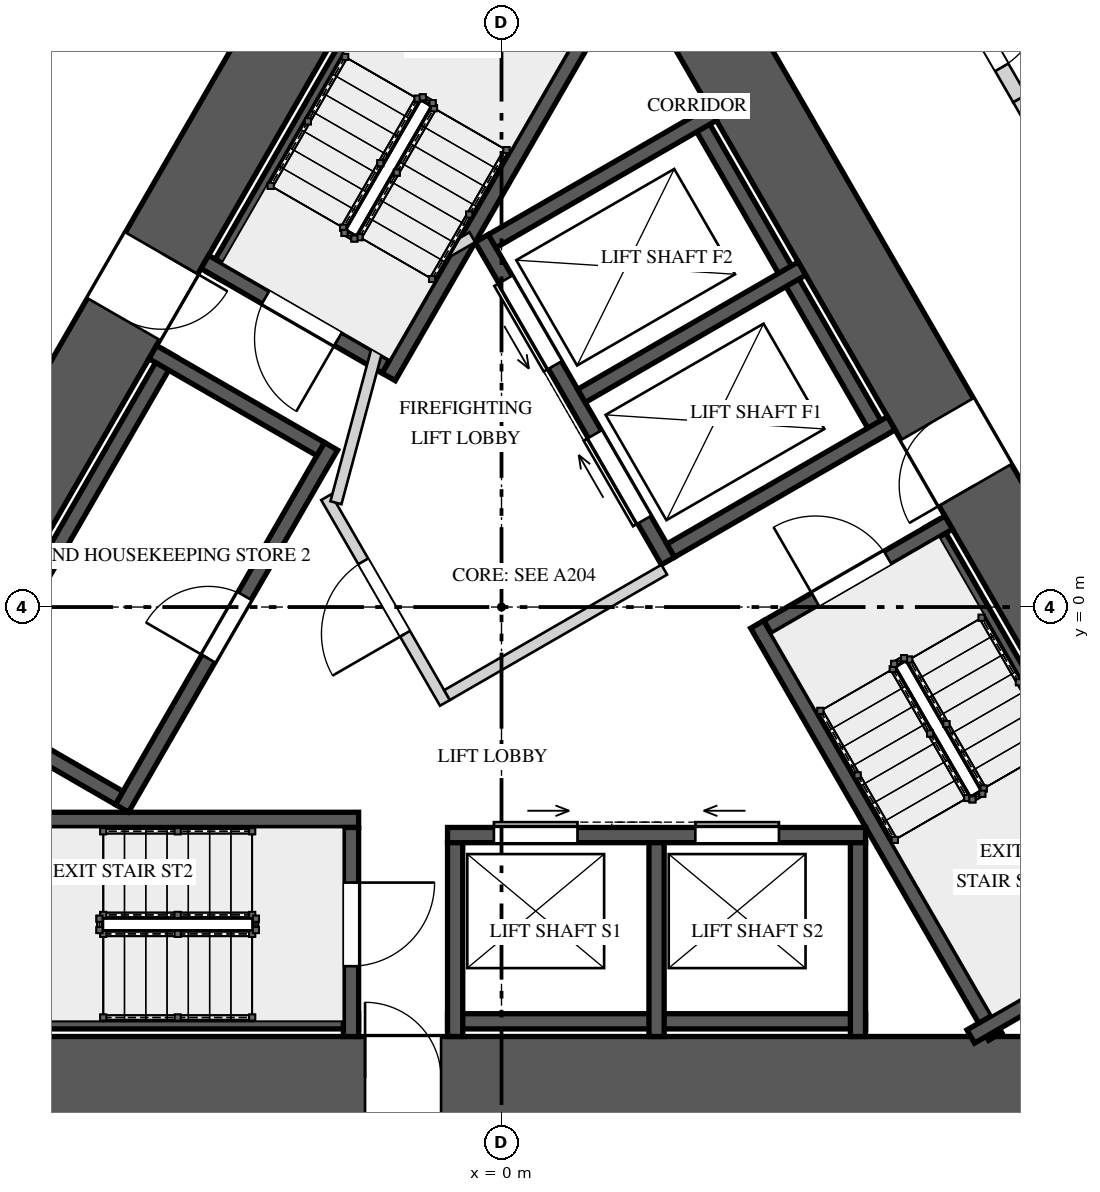
"""IFC4 building model, lengths in metres.
Left out: names, types, materials, properties, quantities, classifications, styles, units other than length and angle.
Written with IfcOpenShell. Run it as: python <this file> out.ifc"""

import sys

from ifc_helpers import new_model, si_unit, direction, frame, frame_2d, origin, place, context, subcontext, project, spatial, rectangle, extrude, element, fill, save


model = new_model("IFC4")
c1 = context("Model", 3, precision=1e-05, world=origin(), true_north=direction((0.0, 1.0)))
c2 = subcontext(c1, "Body", "Model", "MODEL_VIEW")
j1 = project(units=[si_unit("LENGTHUNIT", "METRE"), si_unit("PLANEANGLEUNIT", "RADIAN")], contexts=[c1])
p1 = place(None, origin())
s1 = spatial("IfcSite", under=j1, at=p1, CompositionType="ELEMENT")
p2 = place(p1, origin())
s2 = spatial("IfcBuilding", under=s1, at=p2, CompositionType="ELEMENT")
p3 = place(p2, frame((0.0, 0.0, 15.0)))
s3 = spatial("IfcBuildingStorey", under=s2, at=p3, CompositionType="ELEMENT", Elevation=15.0)
p4 = place(p3, frame((-1.126, 10.45, 0.0), z_axis=(0.0, 0.0, 1.0), x_axis=(-0.500001757713, -0.866024388966, 0.0)))
e1 = element("IfcWall", 1, at=p4, inside=s3, PredefinedType="SHEAR", context=c2, shape_type="SweptSolid", body=[
    extrude(rectangle(XDim=16.974, YDim=1.1, at=frame_2d((8.487, 0.0))), origin(), (0.0, 0.0, 1.0), 5.0),
])
p5 = place(p4, frame((6.692, 0.0, 0.0)))
e2 = element("IfcOpeningElement", 2, at=p5, cuts=e1, PredefinedType="OPENING", context=c2, shape_type="SweptSolid", body=[
    extrude(rectangle(XDim=1.0, YDim=2.4, at=frame_2d((0.5, 1.2))), frame((0.0, 0.56, 0.0), z_axis=(0.0, -1.0, 0.0), x_axis=(1.0, 0.0, 0.0)), (0.0, 0.0, 1.0), 1.12),
])
p6 = place(p4, frame((14.397, 0.0, 0.0)))
e3 = element("IfcOpeningElement", 3, at=p6, cuts=e1, PredefinedType="OPENING", context=c2, shape_type="SweptSolid", body=[
    extrude(rectangle(XDim=0.8, YDim=2.1, at=frame_2d((0.4, 1.05))), frame((0.0, 0.56, 0.0), z_axis=(0.0, -1.0, 0.0), x_axis=(1.0, 0.0, 0.0)), (0.0, 0.0, 1.0), 1.12),
])
p7 = place(p3, frame((-8.487, -6.2, 0.0), z_axis=(0.0, 0.0, 1.0), x_axis=(1.0, 0.0, 0.0)))
e4 = element("IfcWall", 4, at=p7, inside=s3, PredefinedType="SHEAR", context=c2, shape_type="SweptSolid", body=[
    extrude(rectangle(XDim=16.974, YDim=1.1, at=frame_2d((8.487, 0.0))), origin(), (0.0, 0.0, 1.0), 5.0),
])
p8 = place(p7, frame((6.692, 0.0, 0.0)))
e5 = element("IfcOpeningElement", 5, at=p8, cuts=e4, PredefinedType="OPENING", context=c2, shape_type="SweptSolid", body=[
    extrude(rectangle(XDim=1.0, YDim=2.4, at=frame_2d((0.5, 1.2))), frame((0.0, 0.56, 0.0), z_axis=(0.0, -1.0, 0.0), x_axis=(1.0, 0.0, 0.0)), (0.0, 0.0, 1.0), 1.12),
])
p9 = place(p3, frame((9.613, -4.25, 0.0), z_axis=(0.0, 0.0, 1.0), x_axis=(-0.500001757713, 0.866024388966, 0.0)))
e6 = element("IfcWall", 6, at=p9, inside=s3, PredefinedType="SHEAR", context=c2, shape_type="SweptSolid", body=[
    extrude(rectangle(XDim=16.974, YDim=1.1, at=frame_2d((8.487, 0.0))), origin(), (0.0, 0.0, 1.0), 5.0),
])
p10 = place(p9, frame((6.762, 0.0, 0.0)))
e7 = element("IfcOpeningElement", 7, at=p10, cuts=e6, PredefinedType="OPENING", context=c2, shape_type="SweptSolid", body=[
    extrude(rectangle(XDim=1.0, YDim=2.4, at=frame_2d((0.5, 1.2))), frame((0.0, 0.56, 0.0), z_axis=(0.0, -1.0, 0.0), x_axis=(1.0, 0.0, 0.0)), (0.0, 0.0, 1.0), 1.12),
])
p11 = place(p3, frame((-0.68, 9.722, 0.0), z_axis=(0.0, 0.0, 1.0), x_axis=(-0.49998037582, -0.866036733513, 0.0)))
e8 = element("IfcWall", 8, at=p11, inside=s3, PredefinedType="SOLIDWALL", context=c2, shape_type="SweptSolid", body=[
    extrude(rectangle(XDim=6.2, YDim=0.2, at=frame_2d((3.1, 0.0))), origin(), (0.0, 0.0, 1.0), 4.65),
])
p12 = place(p3, frame((1.646, 8.45, 0.0), z_axis=(0.0, 0.0, 1.0), x_axis=(-0.500006002103, -0.866021938441, 0.0)))
e9 = element("IfcWall", 9, at=p12, inside=s3, PredefinedType="SOLIDWALL", context=c2, shape_type="SweptSolid", body=[
    extrude(rectangle(XDim=6.261, YDim=0.2, at=frame_2d((3.13, 0.0))), origin(), (0.0, 0.0, 1.0), 4.65),
])
p13 = place(p3, frame((-1.521, 3.165, 0.0), z_axis=(0.0, 0.0, 1.0), x_axis=(-0.866027397988, 0.499996545922, 0.0)))
e10 = element("IfcWall", 10, at=p13, inside=s3, PredefinedType="SOLIDWALL", context=c2, shape_type="SweptSolid", body=[
    extrude(rectangle(XDim=2.75, YDim=0.2, at=frame_2d((1.375, 0.0))), origin(), (0.0, 0.0, 1.0), 4.65),
])
p14 = place(p13, frame((0.725, 0.0, 0.0)))
e11 = element("IfcOpeningElement", 11, at=p14, cuts=e10, PredefinedType="OPENING", context=c2, shape_type="SweptSolid", body=[
    extrude(rectangle(XDim=1.1, YDim=2.4, at=frame_2d((0.55, 1.2))), frame((0.0, 0.11, 0.0), z_axis=(0.0, -1.0, 0.0), x_axis=(1.0, 0.0, 0.0)), (0.0, 0.0, 1.0), 0.22),
])
p15 = place(p3, frame((-8.08, -5.45, 0.0), z_axis=(0.0, 0.0, 1.0), x_axis=(1.0, 0.0, 0.0)))
e12 = element("IfcWall", 12, at=p15, inside=s3, PredefinedType="SOLIDWALL", context=c2, shape_type="SweptSolid", body=[
    extrude(rectangle(XDim=6.2, YDim=0.2, at=frame_2d((3.1, 0.0))), origin(), (0.0, 0.0, 1.0), 4.65),
])
p16 = place(p3, frame((-8.141, -2.8, 0.0), z_axis=(0.0, 0.0, 1.0), x_axis=(1.0, 0.0, 0.0)))
e13 = element("IfcWall", 13, at=p16, inside=s3, PredefinedType="SOLIDWALL", context=c2, shape_type="SweptSolid", body=[
    extrude(rectangle(XDim=6.261, YDim=0.2, at=frame_2d((3.13, 0.0))), origin(), (0.0, 0.0, 1.0), 4.65),
])
p17 = place(p3, frame((-1.98, -2.9, 0.0), z_axis=(0.0, 0.0, 1.0), x_axis=(0.0, -1.0, 0.0)))
e14 = element("IfcWall", 14, at=p17, inside=s3, PredefinedType="SOLIDWALL", context=c2, shape_type="SweptSolid", body=[
    extrude(rectangle(XDim=2.75, YDim=0.2, at=frame_2d((1.375, 0.0))), origin(), (0.0, 0.0, 1.0), 4.65),
])
p18 = place(p17, frame((0.725, 0.0, 0.0)))
e15 = element("IfcOpeningElement", 15, at=p18, cuts=e14, PredefinedType="OPENING", context=c2, shape_type="SweptSolid", body=[
    extrude(rectangle(XDim=1.1, YDim=2.4, at=frame_2d((0.55, 1.2))), frame((0.0, 0.11, 0.0), z_axis=(0.0, -1.0, 0.0), x_axis=(1.0, 0.0, 0.0)), (0.0, 0.0, 1.0), 0.22),
])
p19 = place(p3, frame((8.76, -4.272, 0.0), z_axis=(0.0, 0.0, 1.0), x_axis=(-0.49998037582, 0.866036733513, 0.0)))
e16 = element("IfcWall", 16, at=p19, inside=s3, PredefinedType="SOLIDWALL", context=c2, shape_type="SweptSolid", body=[
    extrude(rectangle(XDim=6.2, YDim=0.2, at=frame_2d((3.1, 0.0))), origin(), (0.0, 0.0, 1.0), 4.65),
])
p20 = place(p3, frame((6.495, -5.65, 0.0), z_axis=(0.0, 0.0, 1.0), x_axis=(-0.499976754523, 0.866038824151, 0.0)))
e17 = element("IfcWall", 17, at=p20, inside=s3, PredefinedType="SOLIDWALL", context=c2, shape_type="SweptSolid", body=[
    extrude(rectangle(XDim=6.26, YDim=0.2, at=frame_2d((3.13, 0.0))), origin(), (0.0, 0.0, 1.0), 4.65),
])
p21 = place(p3, frame((6.174, -5.65, 0.0), z_axis=(0.0, 0.0, 1.0), x_axis=(0.866054327916, 0.499949898588, 0.0)))
e18 = element("IfcWall", 18, at=p21, inside=s3, PredefinedType="SOLIDWALL", context=c2, shape_type="SweptSolid", body=[
    extrude(rectangle(XDim=3.128, YDim=0.2, at=frame_2d((1.564, 0.0))), origin(), (0.0, 0.0, 1.0), 4.65),
])
p22 = place(p3, frame((3.501, -0.265, 0.0), z_axis=(0.0, 0.0, 1.0), x_axis=(0.866027397988, 0.499996545922, 0.0)))
e19 = element("IfcWall", 19, at=p22, inside=s3, PredefinedType="SOLIDWALL", context=c2, shape_type="SweptSolid", body=[
    extrude(rectangle(XDim=2.75, YDim=0.2, at=frame_2d((1.375, 0.0))), origin(), (0.0, 0.0, 1.0), 4.65),
])
p23 = place(p22, frame((0.725, 0.0, 0.0)))
e20 = element("IfcOpeningElement", 20, at=p23, cuts=e19, PredefinedType="OPENING", context=c2, shape_type="SweptSolid", body=[
    extrude(rectangle(XDim=1.1, YDim=2.4, at=frame_2d((0.55, 1.2))), frame((0.0, 0.11, 0.0), z_axis=(0.0, -1.0, 0.0), x_axis=(1.0, 0.0, 0.0)), (0.0, 0.0, 1.0), 0.22),
])
p24 = place(p3, frame((-4.993, -2.648, 0.0), z_axis=(0.0, 0.0, 1.0), x_axis=(0.499996545922, 0.866027397988, 0.0)))
e21 = element("IfcWall", 21, at=p24, inside=s3, PredefinedType="SOLIDWALL", context=c2, shape_type="SweptSolid", body=[
    extrude(rectangle(XDim=5.5, YDim=0.2, at=frame_2d((2.75, 0.0))), origin(), (0.0, 0.0, 1.0), 4.65),
])
p25 = place(p24, frame((2.275, 0.0, 0.0)))
e22 = element("IfcOpeningElement", 22, at=p25, cuts=e21, PredefinedType="OPENING", context=c2, shape_type="SweptSolid", body=[
    extrude(rectangle(XDim=0.95, YDim=2.4, at=frame_2d((0.475, 1.2))), frame((0.0, 0.11, 0.0), z_axis=(0.0, -1.0, 0.0), x_axis=(1.0, 0.0, 0.0)), (0.0, 0.0, 1.0), 0.22),
])
p26 = place(p3, frame((-4.365, 3.34, 0.0), z_axis=(0.0, 0.0, 1.0), x_axis=(-0.499996545922, -0.866027397988, 0.0)))
e23 = element("IfcWall", 23, at=p26, inside=s3, PredefinedType="SOLIDWALL", context=c2, shape_type="SweptSolid", body=[
    extrude(rectangle(XDim=5.5, YDim=0.2, at=frame_2d((2.75, 0.0))), origin(), (0.0, 0.0, 1.0), 4.65),
])
for number, where, z_axis, x_axis in (
    (24, (-2.38, 2.078, 0.0), (0.0, 0.0, 1.0), (-0.866, 0.5, 0.0)),
    (25, (-5.03, -2.512, 0.0), (0.0, 0.0, 1.0), (-0.866, 0.5, 0.0)),
):
    element("IfcWall", number, at=place(p3, frame(where, z_axis=z_axis, x_axis=x_axis)), inside=s3, PredefinedType="SOLIDWALL", context=c2, shape_type="SweptSolid", body=[
        extrude(rectangle(XDim=2.55, YDim=0.2, at=frame_2d((1.275, 0.0))), origin(), (0.0, 0.0, 1.0), 4.65),
    ])
p27 = place(p3, frame((-0.71, -3.0, 0.0), z_axis=(0.0, 0.0, 1.0), x_axis=(1.0, 0.0, 0.0)))
e26 = element("IfcWall", 26, at=p27, inside=s3, PredefinedType="SOLIDWALL", context=c2, shape_type="SweptSolid", body=[
    extrude(rectangle(XDim=5.5, YDim=0.2, at=frame_2d((2.75, 0.0))), origin(), (0.0, 0.0, 1.0), 4.65),
])
p28 = place(p27, frame((0.61, 0.0, 0.0)))
e27 = element("IfcOpeningElement", 27, at=p28, cuts=e26, PredefinedType="OPENING", context=c2, shape_type="SweptSolid", body=[
    extrude(rectangle(XDim=1.1, YDim=2.1, at=frame_2d((0.55, 1.05))), frame((0.0, 0.11, 0.0), z_axis=(0.0, -1.0, 0.0), x_axis=(1.0, 0.0, 0.0)), (0.0, 0.0, 1.0), 0.22),
])
p29 = place(p27, frame((3.26, 0.0, 0.0)))
e28 = element("IfcOpeningElement", 28, at=p29, cuts=e26, PredefinedType="OPENING", context=c2, shape_type="SweptSolid", body=[
    extrude(rectangle(XDim=1.1, YDim=2.1, at=frame_2d((0.55, 1.05))), frame((0.0, 0.11, 0.0), z_axis=(0.0, -1.0, 0.0), x_axis=(1.0, 0.0, 0.0)), (0.0, 0.0, 1.0), 0.22),
])
p30 = place(p3, frame((-0.71, -5.45, 0.0), z_axis=(0.0, 0.0, 1.0), x_axis=(1.0, 0.0, 0.0)))
e29 = element("IfcWall", 29, at=p30, inside=s3, PredefinedType="SOLIDWALL", context=c2, shape_type="SweptSolid", body=[
    extrude(rectangle(XDim=5.5, YDim=0.2, at=frame_2d((2.75, 0.0))), origin(), (0.0, 0.0, 1.0), 4.65),
])
for number, where, z_axis, x_axis in (
    (30, (-0.61, -3.1, 0.0), (0.0, 0.0, 1.0), (0.0, -1.0, 0.0)),
    (31, (2.04, -3.1, 0.0), (0.0, 0.0, 1.0), (0.0, -1.0, 0.0)),
    (32, (4.69, -3.1, 0.0), (0.0, 0.0, 1.0), (0.0, -1.0, 0.0)),
):
    element("IfcWall", number, at=place(p3, frame(where, z_axis=z_axis, x_axis=x_axis)), inside=s3, PredefinedType="SOLIDWALL", context=c2, shape_type="SweptSolid", body=[
        extrude(rectangle(XDim=2.55, YDim=0.2, at=frame_2d((1.275, 0.0))), origin(), (0.0, 0.0, 1.0), 4.65),
    ])
p31 = place(p3, frame((2.19, 0.606, 0.0), z_axis=(0.0, 0.0, 1.0), x_axis=(-0.500002801628, 0.866023786258, 0.0)))
e33 = element("IfcWall", 33, at=p31, inside=s3, PredefinedType="SOLIDWALL", context=c2, shape_type="SweptSolid", body=[
    extrude(rectangle(XDim=4.9, YDim=0.2, at=frame_2d((2.45, 0.0))), origin(), (0.0, 0.0, 1.0), 4.65),
])
p32 = place(p31, frame((0.625, 0.0, 0.0)))
e34 = element("IfcOpeningElement", 34, at=p32, cuts=e33, PredefinedType="OPENING", context=c2, shape_type="SweptSolid", body=[
    extrude(rectangle(XDim=1.3, YDim=2.1, at=frame_2d((0.65, 1.05))), frame((0.0, 0.11, 0.0), z_axis=(0.0, -1.0, 0.0), x_axis=(1.0, 0.0, 0.0)), (0.0, 0.0, 1.0), 0.22),
])
p33 = place(p31, frame((2.975, 0.0, 0.0)))
e35 = element("IfcOpeningElement", 35, at=p33, cuts=e33, PredefinedType="OPENING", context=c2, shape_type="SweptSolid", body=[
    extrude(rectangle(XDim=1.3, YDim=2.1, at=frame_2d((0.65, 1.05))), frame((0.0, 0.11, 0.0), z_axis=(0.0, -1.0, 0.0), x_axis=(1.0, 0.0, 0.0)), (0.0, 0.0, 1.0), 0.22),
])
p34 = place(p3, frame((5.005, 2.231, 0.0), z_axis=(0.0, 0.0, 1.0), x_axis=(-0.500002801628, 0.866023786258, 0.0)))
e36 = element("IfcWall", 36, at=p34, inside=s3, PredefinedType="SOLIDWALL", context=c2, shape_type="SweptSolid", body=[
    extrude(rectangle(XDim=4.9, YDim=0.2, at=frame_2d((2.45, 0.0))), origin(), (0.0, 0.0, 1.0), 4.65),
])
p35 = place(p3, frame((2.227, 0.743, 0.0), z_axis=(0.0, 0.0, 1.0), x_axis=(0.866014461049, 0.500018952895, 0.0)))
e37 = element("IfcWall", 37, at=p35, inside=s3, PredefinedType="SOLIDWALL", context=c2, shape_type="SweptSolid", body=[
    extrude(rectangle(XDim=3.35, YDim=0.2, at=frame_2d((1.675, 0.0))), origin(), (0.0, 0.0, 1.0), 4.65),
])
p36 = place(p3, frame((1.052, 2.778, 0.0), z_axis=(0.0, 0.0, 1.0), x_axis=(0.866032680314, 0.499987396469, 0.0)))
e38 = element("IfcWall", 38, at=p36, inside=s3, PredefinedType="SOLIDWALL", context=c2, shape_type="SweptSolid", body=[
    extrude(rectangle(XDim=3.35, YDim=0.2, at=frame_2d((1.675, 0.0))), origin(), (0.0, 0.0, 1.0), 4.65),
])
p37 = place(p3, frame((-0.123, 4.813, 0.0), z_axis=(0.0, 0.0, 1.0), x_axis=(0.866014461049, 0.500018952895, 0.0)))
e39 = element("IfcWall", 39, at=p37, inside=s3, PredefinedType="SOLIDWALL", context=c2, shape_type="SweptSolid", body=[
    extrude(rectangle(XDim=3.35, YDim=0.2, at=frame_2d((1.675, 0.0))), origin(), (0.0, 0.0, 1.0), 4.65),
])
p38 = place(p3, frame((-0.744, -1.261, 0.0), z_axis=(0.0, 0.0, 1.0), x_axis=(-0.500004234368, 0.866022959057, 0.0)))
e40 = element("IfcWall", 40, at=p38, inside=s3, PredefinedType="PARTITIONING", context=c2, shape_type="SweptSolid", body=[
    extrude(rectangle(XDim=3.125, YDim=0.15, at=frame_2d((1.562, 0.0))), origin(), (0.0, 0.0, 1.0), 4.65),
])
p39 = place(p38, frame((1.05, 0.0, 0.0)))
e41 = element("IfcOpeningElement", 41, at=p39, cuts=e40, PredefinedType="OPENING", context=c2, shape_type="SweptSolid", body=[
    extrude(rectangle(XDim=1.1, YDim=2.4, at=frame_2d((0.55, 1.2))), frame((0.0, 0.085, 0.0), z_axis=(0.0, -1.0, 0.0), x_axis=(1.0, 0.0, 0.0)), (0.0, 0.0, 1.0), 0.17),
])
p40 = place(p3, frame((-0.717, -1.159, 0.0), z_axis=(0.0, 0.0, 1.0), x_axis=(0.866008176907, 0.50002983664, 0.0)))
e42 = element("IfcWall", 42, at=p40, inside=s3, PredefinedType="PARTITIONING", context=c2, shape_type="SweptSolid", body=[
    extrude(rectangle(XDim=3.3, YDim=0.15, at=frame_2d((1.65, 0.0))), origin(), (0.0, 0.0, 1.0), 4.65),
])
p41 = place(p3, frame((-2.178, 1.372, 0.0), z_axis=(0.0, 0.0, 1.0), x_axis=(0.258808958833, 0.96592852884, 0.0)))
e43 = element("IfcWall", 43, at=p41, inside=s3, PredefinedType="PARTITIONING", context=c2, shape_type="SweptSolid", body=[
    extrude(rectangle(XDim=2.903, YDim=0.15, at=frame_2d((1.451, 0.0))), origin(), (0.0, 0.0, 1.0), 4.65),
])
p42 = place(p3, frame((-1.51, 4.215, 0.0), z_axis=(0.0, 0.0, 1.0), x_axis=(0.866085525409, 0.49989585183, 0.0)))
e44 = element("IfcWall", 44, at=p42, inside=s3, PredefinedType="PARTITIONING", context=c2, shape_type="SweptSolid", body=[
    extrude(rectangle(XDim=1.3, YDim=0.15, at=frame_2d((0.65, 0.0))), origin(), (0.0, 0.0, 1.0), 4.65),
])
p43 = place(p3, frame((5.287, 9.343, 0.0), z_axis=(0.0, 0.0, 1.0), x_axis=(0.499952348839, -0.866052913447, 0.0)))
e45 = element("IfcWall", 45, at=p43, inside=s3, PredefinedType="SOLIDWALL", context=c2, shape_type="SweptSolid", body=[
    extrude(rectangle(XDim=3.064, YDim=0.2, at=frame_2d((1.532, 0.0))), origin(), (0.0, 0.0, 1.0), 4.65),
])
p44 = place(p43, frame((1.489, 0.0, 0.0)))
e46 = element("IfcOpeningElement", 46, at=p44, cuts=e45, PredefinedType="OPENING", context=c2, shape_type="SweptSolid", body=[
    extrude(rectangle(XDim=1.1, YDim=2.4, at=frame_2d((0.55, 1.2))), frame((0.0, 0.11, 0.0), z_axis=(0.0, -1.0, 0.0), x_axis=(1.0, 0.0, 0.0)), (0.0, 0.0, 1.0), 0.22),
])
p45 = place(p3, frame((6.819, 6.689, 0.0), z_axis=(0.0, 0.0, 1.0), x_axis=(0.500118501653, -0.865956976012, 0.0)))
e47 = element("IfcWall", 47, at=p45, inside=s3, PredefinedType="SOLIDWALL", context=c2, shape_type="SweptSolid", body=[
    extrude(rectangle(XDim=0.818, YDim=0.2, at=frame_2d((0.409, 0.0))), origin(), (0.0, 0.0, 1.0), 3.75),
])
p46 = place(p3, frame((-6.819, 6.689, 0.0), z_axis=(0.0, 0.0, 1.0), x_axis=(0.499952348839, 0.866052913447, 0.0)))
e48 = element("IfcWall", 48, at=p46, inside=s3, PredefinedType="SOLIDWALL", context=c2, shape_type="SweptSolid", body=[
    extrude(rectangle(XDim=3.064, YDim=0.2, at=frame_2d((1.532, 0.0))), origin(), (0.0, 0.0, 1.0), 4.65),
])
p47 = place(p14, origin())
e49 = element("IfcDoor", 49, at=p47, inside=s3, OperationType="SINGLE_SWING_RIGHT", PredefinedType="DOOR", context=c2, shape_type="SweptSolid", body=[
    extrude(rectangle(XDim=1.1, YDim=2.4, at=frame_2d((0.55, 1.2))), frame((0.0, 0.025, 0.0), z_axis=(0.0, -1.0, 0.0), x_axis=(1.0, 0.0, 0.0)), (0.0, 0.0, 1.0), 0.05),
])
fill(e11, e49)
p48 = place(p18, origin())
e50 = element("IfcDoor", 50, at=p48, inside=s3, OperationType="SINGLE_SWING_LEFT", PredefinedType="DOOR", context=c2, shape_type="SweptSolid", body=[
    extrude(rectangle(XDim=1.1, YDim=2.4, at=frame_2d((0.55, 1.2))), frame((0.0, 0.025, 0.0), z_axis=(0.0, -1.0, 0.0), x_axis=(1.0, 0.0, 0.0)), (0.0, 0.0, 1.0), 0.05),
])
fill(e15, e50)
p49 = place(p23, origin())
e51 = element("IfcDoor", 51, at=p49, inside=s3, OperationType="SINGLE_SWING_RIGHT", PredefinedType="DOOR", context=c2, shape_type="SweptSolid", body=[
    extrude(rectangle(XDim=1.1, YDim=2.4, at=frame_2d((0.55, 1.2))), frame((0.0, 0.025, 0.0), z_axis=(0.0, -1.0, 0.0), x_axis=(1.0, 0.0, 0.0)), (0.0, 0.0, 1.0), 0.05),
])
fill(e20, e51)
p50 = place(p25, origin())
e52 = element("IfcDoor", 52, at=p50, inside=s3, OperationType="SINGLE_SWING_LEFT", PredefinedType="DOOR", context=c2, shape_type="SweptSolid", body=[
    extrude(rectangle(XDim=0.95, YDim=2.4, at=frame_2d((0.475, 1.2))), frame((0.0, 0.025, 0.0), z_axis=(0.0, -1.0, 0.0), x_axis=(1.0, 0.0, 0.0)), (0.0, 0.0, 1.0), 0.05),
])
fill(e22, e52)
p51 = place(p28, origin())
e53 = element("IfcDoor", 53, at=p51, inside=s3, OperationType="SLIDING_TO_RIGHT", PredefinedType="DOOR", context=c2, shape_type="SweptSolid", body=[
    extrude(rectangle(XDim=1.1, YDim=2.1, at=frame_2d((0.55, 1.05))), frame((0.0, 0.025, 0.0), z_axis=(0.0, -1.0, 0.0), x_axis=(1.0, 0.0, 0.0)), (0.0, 0.0, 1.0), 0.05),
])
fill(e27, e53)
p52 = place(p29, origin())
e54 = element("IfcDoor", 54, at=p52, inside=s3, OperationType="SLIDING_TO_LEFT", PredefinedType="DOOR", context=c2, shape_type="SweptSolid", body=[
    extrude(rectangle(XDim=1.1, YDim=2.1, at=frame_2d((0.55, 1.05))), frame((0.0, 0.025, 0.0), z_axis=(0.0, -1.0, 0.0), x_axis=(1.0, 0.0, 0.0)), (0.0, 0.0, 1.0), 0.05),
])
fill(e28, e54)
p53 = place(p32, origin())
e55 = element("IfcDoor", 55, at=p53, inside=s3, OperationType="SLIDING_TO_RIGHT", PredefinedType="DOOR", context=c2, shape_type="SweptSolid", body=[
    extrude(rectangle(XDim=1.3, YDim=2.1, at=frame_2d((0.65, 1.05))), frame((0.0, 0.025, 0.0), z_axis=(0.0, -1.0, 0.0), x_axis=(1.0, 0.0, 0.0)), (0.0, 0.0, 1.0), 0.05),
])
fill(e34, e55)
p54 = place(p33, origin())
e56 = element("IfcDoor", 56, at=p54, inside=s3, OperationType="SLIDING_TO_LEFT", PredefinedType="DOOR", context=c2, shape_type="SweptSolid", body=[
    extrude(rectangle(XDim=1.3, YDim=2.1, at=frame_2d((0.65, 1.05))), frame((0.0, 0.025, 0.0), z_axis=(0.0, -1.0, 0.0), x_axis=(1.0, 0.0, 0.0)), (0.0, 0.0, 1.0), 0.05),
])
fill(e35, e56)
p55 = place(p39, origin())
e57 = element("IfcDoor", 57, at=p55, inside=s3, OperationType="SINGLE_SWING_RIGHT", PredefinedType="DOOR", context=c2, shape_type="SweptSolid", body=[
    extrude(rectangle(XDim=1.1, YDim=2.4, at=frame_2d((0.55, 1.2))), frame((0.0, 0.025, 0.0), z_axis=(0.0, -1.0, 0.0), x_axis=(1.0, 0.0, 0.0)), (0.0, 0.0, 1.0), 0.05),
])
fill(e41, e57)
p56 = place(p5, origin())
e58 = element("IfcDoor", 58, at=p56, inside=s3, OperationType="SINGLE_SWING_LEFT", PredefinedType="DOOR", context=c2, shape_type="SweptSolid", body=[
    extrude(rectangle(XDim=1.0, YDim=2.4, at=frame_2d((0.5, 1.2))), frame((0.0, 0.025, 0.0), z_axis=(0.0, -1.0, 0.0), x_axis=(1.0, 0.0, 0.0)), (0.0, 0.0, 1.0), 0.05),
])
fill(e2, e58)
p57 = place(p8, origin())
e59 = element("IfcDoor", 59, at=p57, inside=s3, OperationType="SINGLE_SWING_RIGHT", PredefinedType="DOOR", context=c2, shape_type="SweptSolid", body=[
    extrude(rectangle(XDim=1.0, YDim=2.4, at=frame_2d((0.5, 1.2))), frame((0.0, 0.025, 0.0), z_axis=(0.0, -1.0, 0.0), x_axis=(1.0, 0.0, 0.0)), (0.0, 0.0, 1.0), 0.05),
])
fill(e5, e59)
p58 = place(p10, origin())
e60 = element("IfcDoor", 60, at=p58, inside=s3, OperationType="SINGLE_SWING_LEFT", PredefinedType="DOOR", context=c2, shape_type="SweptSolid", body=[
    extrude(rectangle(XDim=1.0, YDim=2.4, at=frame_2d((0.5, 1.2))), frame((0.0, 0.025, 0.0), z_axis=(0.0, -1.0, 0.0), x_axis=(1.0, 0.0, 0.0)), (0.0, 0.0, 1.0), 0.05),
])
fill(e7, e60)
p59 = place(p44, origin())
e61 = element("IfcDoor", 61, at=p59, inside=s3, OperationType="SINGLE_SWING_LEFT", PredefinedType="DOOR", context=c2, shape_type="SweptSolid", body=[
    extrude(rectangle(XDim=1.1, YDim=2.4, at=frame_2d((0.55, 1.2))), frame((0.0, 0.025, 0.0), z_axis=(0.0, -1.0, 0.0), x_axis=(1.0, 0.0, 0.0)), (0.0, 0.0, 1.0), 0.05),
])
fill(e46, e61)
save(model, sys.argv[1])
